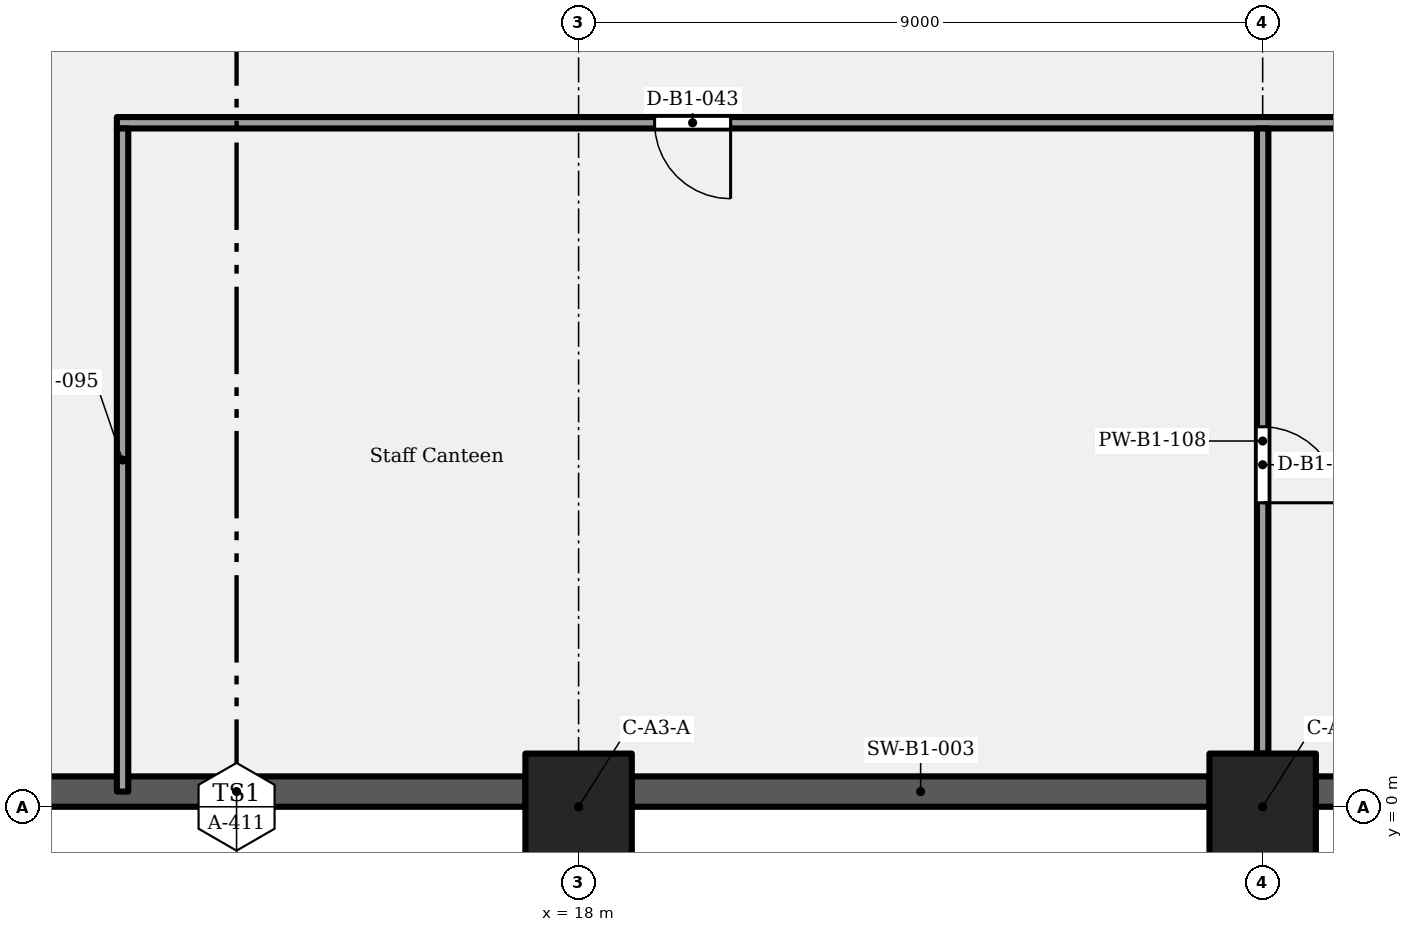
"""IFC4 building model, lengths in metres.
Left out: names, types, materials, properties, quantities, classifications, styles, units other than length and angle.
Written with IfcOpenShell. Run it as: python <this file> out.ifc"""

import sys

from ifc_helpers import new_model, si_unit, direction, frame, frame_2d, origin, origin_2d, place, context, subcontext, project, spatial, rectangle, extrude, element, fill, save


model = new_model("IFC4")
c1 = context("Model", 3, precision=1e-05, world=origin(), true_north=direction((0.0, 1.0)))
c2 = subcontext(c1, "Body", "Model", "MODEL_VIEW")
j1 = project(units=[si_unit("LENGTHUNIT", "METRE"), si_unit("PLANEANGLEUNIT", "RADIAN")], contexts=[c1])
p1 = place(None, origin())
s1 = spatial("IfcSite", under=j1, at=p1, CompositionType="ELEMENT")
p2 = place(p1, origin())
s2 = spatial("IfcBuilding", under=s1, at=p2, CompositionType="ELEMENT")
p3 = place(p2, frame((0.0, 0.0, -4.2)))
s3 = spatial("IfcBuildingStorey", under=s2, at=p3, CompositionType="ELEMENT", Elevation=-4.2)
for number, where, z_axis, x_axis in (
    (1, (18.0, 0.0, 0.0), (0.0, 0.0, 1.0), (1.0, 0.0, 0.0)),
    (2, (27.0, 0.0, 0.0), (0.0, 0.0, 1.0), (1.0, 0.0, 0.0)),
):
    element("IfcColumn", number, at=place(p3, frame(where, z_axis=z_axis, x_axis=x_axis)), inside=s3, PredefinedType="COLUMN", context=c2, shape_type="SweptSolid", body=[
        extrude(rectangle(XDim=1.4, YDim=1.4, at=origin_2d()), origin(), (0.0, 0.0, 1.0), 4.2),
    ])
for number, where, z_axis, x_axis in (
    (3, (9.7, 0.2, 0.0), (0.0, 0.0, 1.0), (1.0, 0.0, 0.0)),
    (4, (18.7, 0.2, 0.0), (0.0, 0.0, 1.0), (1.0, 0.0, 0.0)),
    (5, (27.7, 0.2, 0.0), (0.0, 0.0, 1.0), (1.0, 0.0, 0.0)),
):
    element("IfcWall", number, at=place(p3, frame(where, z_axis=z_axis, x_axis=x_axis)), inside=s3, PredefinedType="SOLIDWALL", context=c2, shape_type="SweptSolid", body=[
        extrude(rectangle(XDim=7.6, YDim=0.4, at=frame_2d((3.8, 0.0))), origin(), (0.0, 0.0, 1.0), 3.9),
    ])
p4 = place(p3, frame((11.925, 9.0, 0.0), z_axis=(0.0, 0.0, 1.0), x_axis=(1.0, 0.0, 0.0)))
e6 = element("IfcWall", 6, at=p4, inside=s3, PredefinedType="PARTITIONING", context=c2, shape_type="SweptSolid", body=[
    extrude(rectangle(XDim=66.15, YDim=0.15, at=frame_2d((33.075, 0.0))), origin(), (0.0, 0.0, 1.0), 3.9),
])
p5 = place(p4, frame((8.075, 0.0, 0.0), z_axis=(0.0, 0.0, 1.0), x_axis=(-1.0, 0.0, 0.0)))
e7 = element("IfcOpeningElement", 7, at=p5, cuts=e6, PredefinedType="OPENING", context=c2, shape_type="SweptSolid", body=[
    extrude(rectangle(XDim=1.0, YDim=2.1, at=frame_2d((0.5, 1.05))), frame((0.0, 0.085, 0.0), z_axis=(0.0, -1.0, 0.0), x_axis=(1.0, 0.0, 0.0)), (0.0, 0.0, 1.0), 0.17),
])
p6 = place(p4, frame((24.975, 0.0, 0.0), z_axis=(0.0, 0.0, 1.0), x_axis=(-1.0, 0.0, 0.0)))
e8 = element("IfcOpeningElement", 8, at=p6, cuts=e6, PredefinedType="OPENING", context=c2, shape_type="SweptSolid", body=[
    extrude(rectangle(XDim=1.8, YDim=2.1, at=frame_2d((0.9, 1.05))), frame((0.0, 0.085, 0.0), z_axis=(0.0, -1.0, 0.0), x_axis=(1.0, 0.0, 0.0)), (0.0, 0.0, 1.0), 0.17),
])
p7 = place(p4, frame((42.975, 0.0, 0.0), z_axis=(0.0, 0.0, 1.0), x_axis=(-1.0, 0.0, 0.0)))
e9 = element("IfcOpeningElement", 9, at=p7, cuts=e6, PredefinedType="OPENING", context=c2, shape_type="SweptSolid", body=[
    extrude(rectangle(XDim=1.8, YDim=2.1, at=frame_2d((0.9, 1.05))), frame((0.0, 0.085, 0.0), z_axis=(0.0, -1.0, 0.0), x_axis=(1.0, 0.0, 0.0)), (0.0, 0.0, 1.0), 0.17),
])
p8 = place(p4, frame((59.075, 0.0, 0.0), z_axis=(0.0, 0.0, 1.0), x_axis=(-1.0, 0.0, 0.0)))
e10 = element("IfcOpeningElement", 10, at=p8, cuts=e6, PredefinedType="OPENING", context=c2, shape_type="SweptSolid", body=[
    extrude(rectangle(XDim=1.0, YDim=2.1, at=frame_2d((0.5, 1.05))), frame((0.0, 0.085, 0.0), z_axis=(0.0, -1.0, 0.0), x_axis=(1.0, 0.0, 0.0)), (0.0, 0.0, 1.0), 0.17),
])
p9 = place(p3, frame((12.0, 0.2, 0.0), z_axis=(0.0, 0.0, 1.0), x_axis=(0.0, 1.0, 0.0)))
e11 = element("IfcWall", 11, at=p9, inside=s3, PredefinedType="PARTITIONING", context=c2, shape_type="SweptSolid", body=[
    extrude(rectangle(XDim=8.725, YDim=0.15, at=frame_2d((4.363, 0.0))), origin(), (0.0, 0.0, 1.0), 3.9),
])
p10 = place(p3, frame((27.0, 0.7, 0.0), z_axis=(0.0, 0.0, 1.0), x_axis=(0.0, 1.0, 0.0)))
e12 = element("IfcWall", 12, at=p10, inside=s3, PredefinedType="PARTITIONING", context=c2, shape_type="SweptSolid", body=[
    extrude(rectangle(XDim=8.225, YDim=0.15, at=frame_2d((4.113, 0.0))), origin(), (0.0, 0.0, 1.0), 3.15),
])
p11 = place(p10, frame((4.3, 0.0, 0.0), z_axis=(0.0, 0.0, 1.0), x_axis=(-1.0, 0.0, 0.0)))
e13 = element("IfcOpeningElement", 13, at=p11, cuts=e12, PredefinedType="OPENING", context=c2, shape_type="SweptSolid", body=[
    extrude(rectangle(XDim=1.0, YDim=2.1, at=frame_2d((0.5, 1.05))), frame((0.0, 0.085, 0.0), z_axis=(0.0, -1.0, 0.0), x_axis=(1.0, 0.0, 0.0)), (0.0, 0.0, 1.0), 0.17),
])
p12 = place(p5, origin())
e14 = element("IfcDoor", 14, at=p12, inside=s3, OperationType="SINGLE_SWING_LEFT", PredefinedType="DOOR", context=c2, shape_type="SweptSolid", body=[
    extrude(rectangle(XDim=1.0, YDim=2.1, at=frame_2d((0.5, 1.05))), frame((0.0, 0.025, 0.0), z_axis=(0.0, -1.0, 0.0), x_axis=(1.0, 0.0, 0.0)), (0.0, 0.0, 1.0), 0.05),
])
fill(e7, e14)
p13 = place(p11, origin())
e15 = element("IfcDoor", 15, at=p13, inside=s3, OperationType="SINGLE_SWING_RIGHT", PredefinedType="DOOR", context=c2, shape_type="SweptSolid", body=[
    extrude(rectangle(XDim=1.0, YDim=2.1, at=frame_2d((0.5, 1.05))), frame((0.0, 0.025, 0.0), z_axis=(0.0, -1.0, 0.0), x_axis=(1.0, 0.0, 0.0)), (0.0, 0.0, 1.0), 0.05),
])
fill(e13, e15)
save(model, sys.argv[1])
